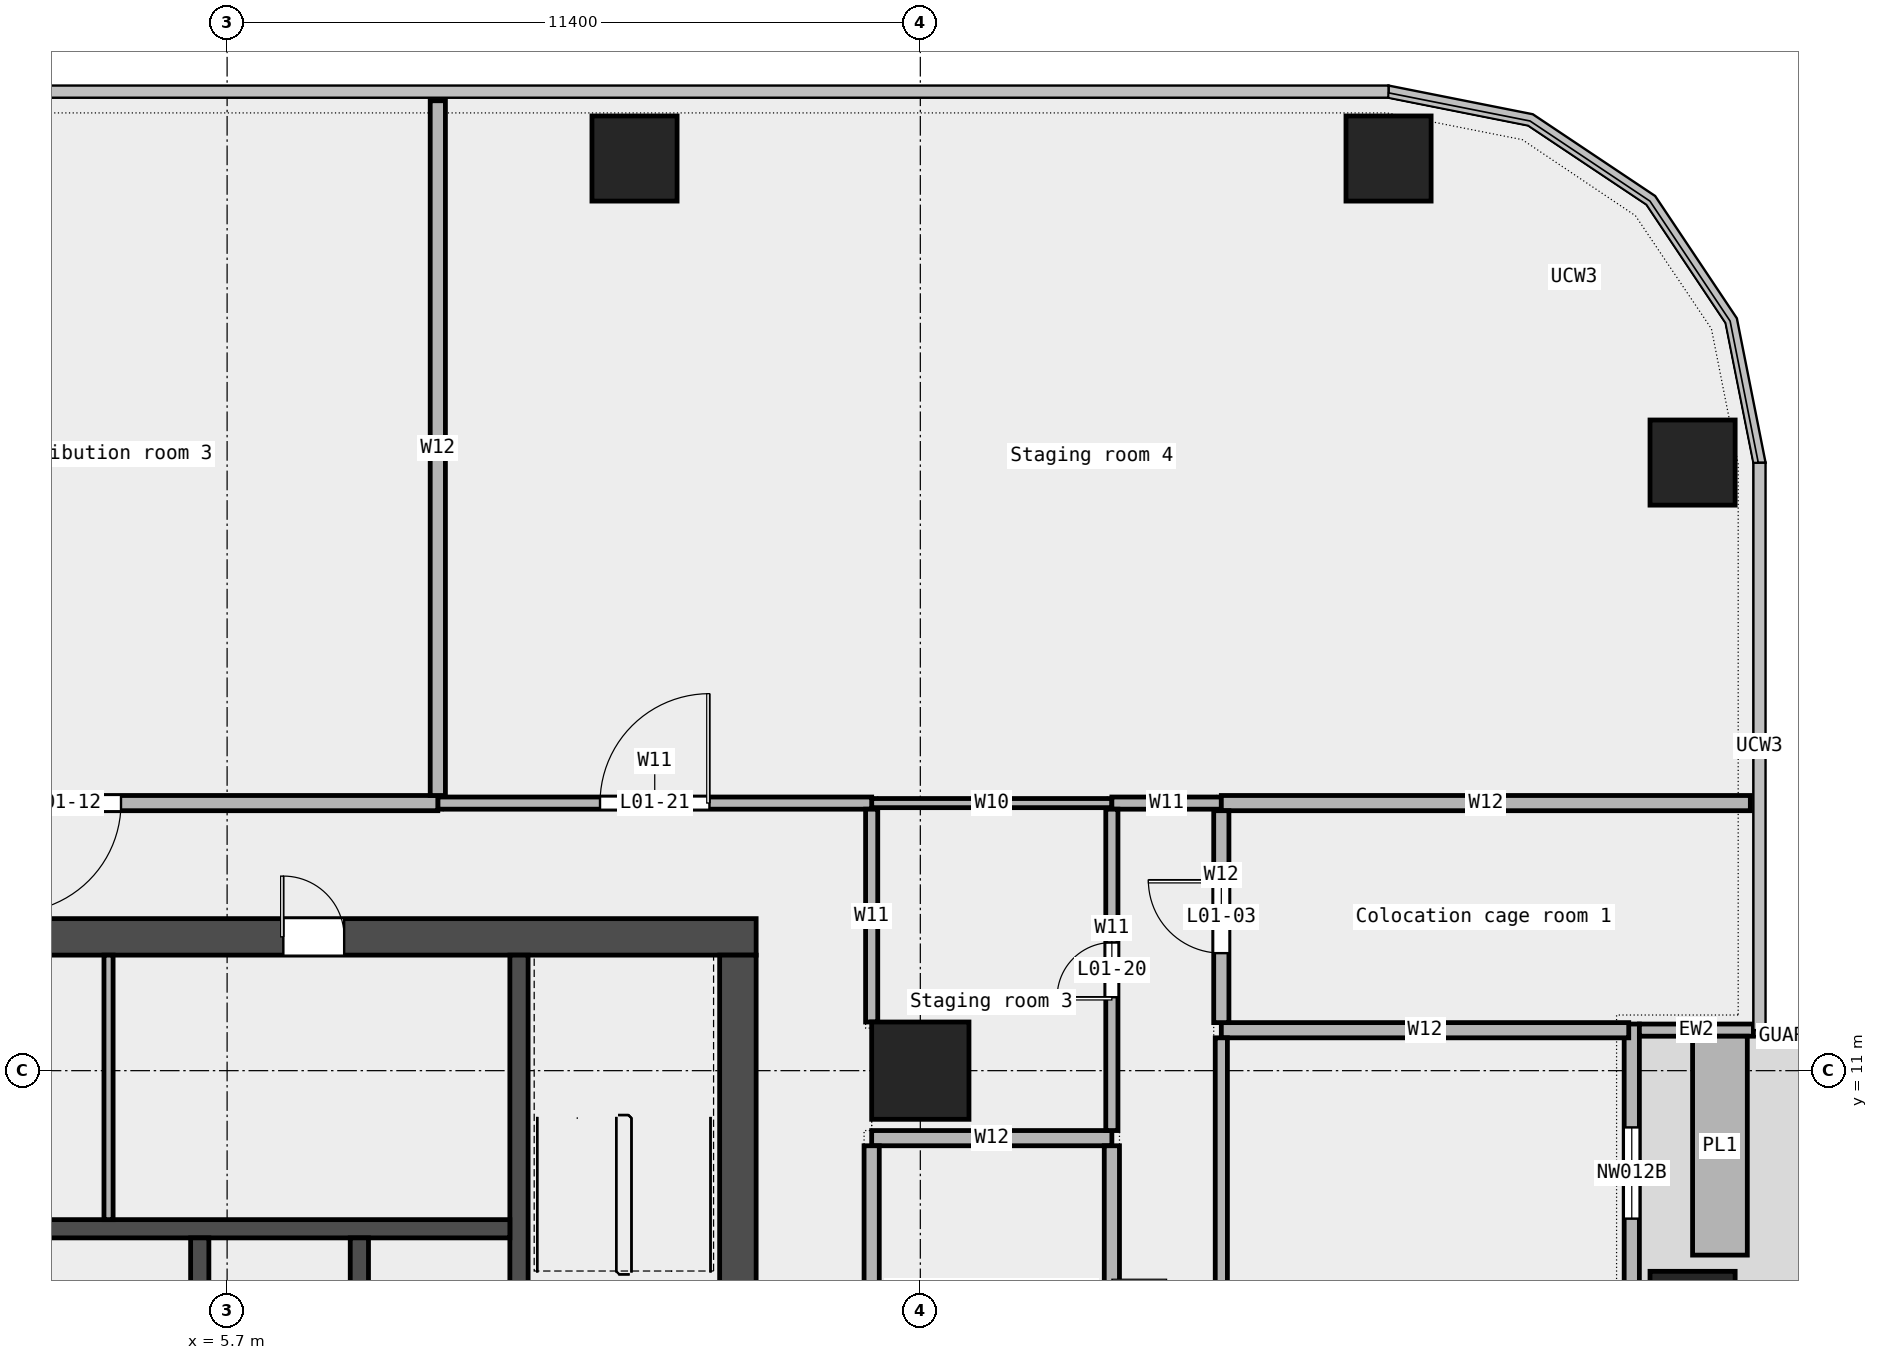
"""IFC4 building model, lengths in metres.
Left out: names, types, materials, properties, quantities, classifications, styles, units other than length and angle.
Written with IfcOpenShell. Run it as: python <this file> out.ifc"""

import sys

from ifc_helpers import new_model, si_unit, direction, frame, frame_2d, origin, origin_2d, place, context, subcontext, project, spatial, rectangle, extrude, element, fill, save


model = new_model("IFC4")
c1 = context("Model", 3, precision=1e-05, world=origin(), true_north=direction((0.0, 1.0)))
c2 = subcontext(c1, "Body", "Model", "MODEL_VIEW")
j1 = project(units=[si_unit("LENGTHUNIT", "METRE"), si_unit("PLANEANGLEUNIT", "RADIAN")], contexts=[c1])
p1 = place(None, origin())
s1 = spatial("IfcSite", under=j1, at=p1, CompositionType="ELEMENT")
p2 = place(p1, origin())
s2 = spatial("IfcBuilding", under=s1, at=p2, CompositionType="ELEMENT")
p3 = place(p2, frame((0.0, 0.0, 9.0)))
s3 = spatial("IfcBuildingStorey", under=s2, at=p3, CompositionType="ELEMENT", Elevation=9.0)
for number, where, z_axis, x_axis in (
    (1, (29.8, 7.0, 0.0), (0.0, 0.0, 1.0), (1.0, 0.0, 0.0)),
    (2, (29.8, 21.0, 0.0), (0.0, 0.0, 1.0), (1.0, 0.0, 0.0)),
    (3, (24.8, 26.0, 0.0), (0.0, 0.0, 1.0), (1.0, 0.0, 0.0)),
    (4, (12.4, 26.0, 0.0), (0.0, 0.0, 1.0), (1.0, 0.0, 0.0)),
):
    element("IfcColumn", number, at=place(p3, frame(where, z_axis=z_axis, x_axis=x_axis)), inside=s3, PredefinedType="COLUMN", context=c2, shape_type="SweptSolid", body=[
        extrude(rectangle(XDim=1.4, YDim=1.4, at=origin_2d()), origin(), (0.0, 0.0, 1.0), 5.0),
    ])
p4 = place(p3, frame((17.1, 11.0, 0.0), z_axis=(0.0, 0.0, 1.0), x_axis=(1.0, 0.0, 0.0)))
e5 = element("IfcColumn", 5, at=p4, inside=s3, PredefinedType="COLUMN", context=c2, shape_type="SweptSolid", body=[
    extrude(rectangle(XDim=1.6, YDim=1.6, at=origin_2d()), origin(), (0.0, 0.0, 1.0), 5.0),
])
p5 = place(p3, frame((28.8, -2.433, 0.0), z_axis=(0.0, 0.0, 1.0), x_axis=(0.0, 1.0, 0.0)))
e6 = element("IfcWall", 6, at=p5, inside=s3, PredefinedType="STANDARD", context=c2, shape_type="SweptSolid", body=[
    extrude(rectangle(XDim=14.2, YDim=0.25, at=frame_2d((7.1, 0.0))), origin(), (0.0, 0.0, 1.0), 5.0),
])
p6 = place(p5, frame((1.75, 0.0, 0.45)))
e7 = element("IfcOpeningElement", 7, at=p6, cuts=e6, PredefinedType="OPENING", context=c2, shape_type="SweptSolid", body=[
    extrude(rectangle(XDim=1.5, YDim=3.0, at=frame_2d((0.75, 1.5))), frame((0.0, 0.137, 0.0), z_axis=(0.0, -1.0, 0.0), x_axis=(1.0, 0.0, 0.0)), (0.0, 0.0, 1.0), 0.274),
])
p7 = place(p5, frame((6.25, 0.0, 0.0)))
e8 = element("IfcOpeningElement", 8, at=p7, cuts=e6, PredefinedType="OPENING", context=c2, shape_type="SweptSolid", body=[
    extrude(rectangle(XDim=1.8, YDim=2.4, at=frame_2d((0.9, 1.2))), frame((0.0, 0.137, 0.0), z_axis=(0.0, -1.0, 0.0), x_axis=(1.0, 0.0, 0.0)), (0.0, 0.0, 1.0), 0.274),
])
p8 = place(p5, frame((11.0, 0.0, 0.45)))
e9 = element("IfcOpeningElement", 9, at=p8, cuts=e6, PredefinedType="OPENING", context=c2, shape_type="SweptSolid", body=[
    extrude(rectangle(XDim=1.5, YDim=3.0, at=frame_2d((0.75, 1.5))), frame((0.0, 0.137, 0.0), z_axis=(0.0, -1.0, 0.0), x_axis=(1.0, 0.0, 0.0)), (0.0, 0.0, 1.0), 0.274),
])
p9 = place(p3, frame((30.8, 11.667, 0.0), z_axis=(0.0, 0.0, 1.0), x_axis=(-1.0, 0.0, 0.0)))
e10 = element("IfcWall", 10, at=p9, inside=s3, PredefinedType="STANDARD", context=c2, shape_type="SweptSolid", body=[
    extrude(rectangle(XDim=1.875, YDim=0.2, at=frame_2d((0.938, 0.0))), origin(), (0.0, 0.0, 1.0), 5.0),
])
p10 = place(p3, frame((30.25, 7.967, 0.0), z_axis=(0.0, 0.0, 1.0), x_axis=(0.0, 1.0, 0.0)))
e11 = element("IfcWall", 11, at=p10, inside=s3, PredefinedType="STANDARD", context=c2, shape_type="SweptSolid", body=[
    extrude(rectangle(XDim=3.6, YDim=0.9, at=frame_2d((1.8, 0.0))), origin(), (0.0, 0.0, 1.0), 0.7),
])
p11 = place(p3, frame((16.3, 9.89, 0.0), z_axis=(0.0, 0.0, 1.0), x_axis=(1.0, 0.0, 0.0)))
e12 = element("IfcWall", 12, at=p11, inside=s3, PredefinedType="PARTITIONING", context=c2, shape_type="SweptSolid", body=[
    extrude(rectangle(XDim=3.95, YDim=0.25, at=frame_2d((1.975, 0.0))), origin(), (0.0, 0.0, 1.0), 5.0),
])
p12 = place(p3, frame((22.05, 11.665, 0.0), z_axis=(0.0, 0.0, 1.0), x_axis=(1.0, 0.0, 0.0)))
e13 = element("IfcWall", 13, at=p12, inside=s3, PredefinedType="PARTITIONING", context=c2, shape_type="SweptSolid", body=[
    extrude(rectangle(XDim=6.7, YDim=0.25, at=frame_2d((3.35, 0.0))), origin(), (0.0, 0.0, 1.0), 5.0),
])
p13 = place(p3, frame((16.3, 15.4, 0.0), z_axis=(0.0, 0.0, 1.0), x_axis=(1.0, 0.0, 0.0)))
e14 = element("IfcWall", 14, at=p13, inside=s3, PredefinedType="PARTITIONING", context=c2, shape_type="SweptSolid", body=[
    extrude(rectangle(XDim=3.95, YDim=0.15, at=frame_2d((1.975, 0.0))), origin(), (0.0, 0.0, 1.0), 5.0),
])
p14 = place(p3, frame((9.165, 15.4, 0.0), z_axis=(0.0, 0.0, 1.0), x_axis=(1.0, 0.0, 0.0)))
e15 = element("IfcWall", 15, at=p14, inside=s3, PredefinedType="PARTITIONING", context=c2, shape_type="SweptSolid", body=[
    extrude(rectangle(XDim=7.135, YDim=0.2, at=frame_2d((3.567, 0.0))), origin(), (0.0, 0.0, 1.0), 5.0),
])
p15 = place(p14, frame((2.667, 0.0, 0.0)))
e16 = element("IfcOpeningElement", 16, at=p15, cuts=e15, PredefinedType="OPENING", context=c2, shape_type="SweptSolid", body=[
    extrude(rectangle(XDim=1.8, YDim=2.1, at=frame_2d((0.9, 1.05))), frame((0.0, 0.112, 0.0), z_axis=(0.0, -1.0, 0.0), x_axis=(1.0, 0.0, 0.0)), (0.0, 0.0, 1.0), 0.224),
])
p16 = place(p3, frame((20.25, 15.4, 0.0), z_axis=(0.0, 0.0, 1.0), x_axis=(1.0, 0.0, 0.0)))
e17 = element("IfcWall", 17, at=p16, inside=s3, PredefinedType="PARTITIONING", context=c2, shape_type="SweptSolid", body=[
    extrude(rectangle(XDim=1.8, YDim=0.2, at=frame_2d((0.9, 0.0))), origin(), (0.0, 0.0, 1.0), 5.0),
])
p17 = place(p3, frame((-22.55, 15.4, 0.0), z_axis=(0.0, 0.0, 1.0), x_axis=(1.0, 0.0, 0.0)))
e18 = element("IfcWall", 18, at=p17, inside=s3, PredefinedType="PARTITIONING", context=c2, shape_type="SweptSolid", body=[
    extrude(rectangle(XDim=31.715, YDim=0.25, at=frame_2d((15.857, 0.0))), origin(), (0.0, 0.0, 1.0), 5.0),
])
p18 = place(p17, frame((12.485, 0.0, 0.0)))
e19 = element("IfcOpeningElement", 19, at=p18, cuts=e18, PredefinedType="OPENING", context=c2, shape_type="SweptSolid", body=[
    extrude(rectangle(XDim=1.8, YDim=2.1, at=frame_2d((0.9, 1.05))), frame((0.0, 0.137, 0.0), z_axis=(0.0, -1.0, 0.0), x_axis=(1.0, 0.0, 0.0)), (0.0, 0.0, 1.0), 0.274),
])
p19 = place(p17, frame((24.705, 0.0, 0.0)))
e20 = element("IfcOpeningElement", 20, at=p19, cuts=e18, PredefinedType="OPENING", context=c2, shape_type="SweptSolid", body=[
    extrude(rectangle(XDim=1.8, YDim=2.1, at=frame_2d((0.9, 1.05))), frame((0.0, 0.137, 0.0), z_axis=(0.0, -1.0, 0.0), x_axis=(1.0, 0.0, 0.0)), (0.0, 0.0, 1.0), 0.274),
])
p20 = place(p3, frame((22.05, 15.4, 0.0), z_axis=(0.0, 0.0, 1.0), x_axis=(1.0, 0.0, 0.0)))
e21 = element("IfcWall", 21, at=p20, inside=s3, PredefinedType="PARTITIONING", context=c2, shape_type="SweptSolid", body=[
    extrude(rectangle(XDim=8.7, YDim=0.25, at=frame_2d((4.35, 0.0))), origin(), (0.0, 0.0, 1.0), 5.0),
])
p21 = place(p3, frame((9.165, 15.525, 0.0), z_axis=(0.0, 0.0, 1.0), x_axis=(0.0, 1.0, 0.0)))
e22 = element("IfcWall", 22, at=p21, inside=s3, PredefinedType="PARTITIONING", context=c2, shape_type="SweptSolid", body=[
    extrude(rectangle(XDim=11.425, YDim=0.25, at=frame_2d((5.712, 0.0))), origin(), (0.0, 0.0, 1.0), 5.0),
])
p22 = place(p3, frame((16.3, 11.8, 0.0), z_axis=(0.0, 0.0, 1.0), x_axis=(0.0, 1.0, 0.0)))
e23 = element("IfcWall", 23, at=p22, inside=s3, PredefinedType="PARTITIONING", context=c2, shape_type="SweptSolid", body=[
    extrude(rectangle(XDim=3.5, YDim=0.2, at=frame_2d((1.75, 0.0))), origin(), (0.0, 0.0, 1.0), 5.0),
])
p23 = place(p3, frame((16.3, 0.8, 0.0), z_axis=(0.0, 0.0, 1.0), x_axis=(0.0, 1.0, 0.0)))
e24 = element("IfcWall", 24, at=p23, inside=s3, PredefinedType="PARTITIONING", context=c2, shape_type="SweptSolid", body=[
    extrude(rectangle(XDim=8.965, YDim=0.25, at=frame_2d((4.482, 0.0))), origin(), (0.0, 0.0, 1.0), 5.0),
])
p24 = place(p3, frame((20.25, 10.015, 0.0), z_axis=(0.0, 0.0, 1.0), x_axis=(0.0, 1.0, 0.0)))
e25 = element("IfcWall", 25, at=p24, inside=s3, PredefinedType="PARTITIONING", context=c2, shape_type="SweptSolid", body=[
    extrude(rectangle(XDim=5.285, YDim=0.2, at=frame_2d((2.643, 0.0))), origin(), (0.0, 0.0, 1.0), 5.0),
])
p25 = place(p24, frame((2.192, 0.0, 0.0)))
e26 = element("IfcOpeningElement", 26, at=p25, cuts=e25, PredefinedType="OPENING", context=c2, shape_type="SweptSolid", body=[
    extrude(rectangle(XDim=0.9, YDim=2.1, at=frame_2d((0.45, 1.05))), frame((0.0, 0.112, 0.0), z_axis=(0.0, -1.0, 0.0), x_axis=(1.0, 0.0, 0.0)), (0.0, 0.0, 1.0), 0.224),
])
p26 = place(p3, frame((20.25, -1.0, 0.0), z_axis=(0.0, 0.0, 1.0), x_axis=(0.0, 1.0, 0.0)))
e27 = element("IfcWall", 27, at=p26, inside=s3, PredefinedType="PARTITIONING", context=c2, shape_type="SweptSolid", body=[
    extrude(rectangle(XDim=10.765, YDim=0.25, at=frame_2d((5.382, 0.0))), origin(), (0.0, 0.0, 1.0), 5.0),
])
p27 = place(p26, frame((2.242, 0.0, 0.0)))
e28 = element("IfcOpeningElement", 28, at=p27, cuts=e27, PredefinedType="OPENING", context=c2, shape_type="SweptSolid", body=[
    extrude(rectangle(XDim=0.9, YDim=2.1, at=frame_2d((0.45, 1.05))), frame((0.0, 0.137, 0.0), z_axis=(0.0, -1.0, 0.0), x_axis=(1.0, 0.0, 0.0)), (0.0, 0.0, 1.0), 0.274),
])
p28 = place(p26, frame((7.625, 0.0, 0.0)))
e29 = element("IfcOpeningElement", 29, at=p28, cuts=e27, PredefinedType="OPENING", context=c2, shape_type="SweptSolid", body=[
    extrude(rectangle(XDim=0.9, YDim=2.1, at=frame_2d((0.45, 1.05))), frame((0.0, 0.137, 0.0), z_axis=(0.0, -1.0, 0.0), x_axis=(1.0, 0.0, 0.0)), (0.0, 0.0, 1.0), 0.274),
])
p29 = place(p3, frame((22.05, -2.21, 0.0), z_axis=(0.0, 0.0, 1.0), x_axis=(0.0, 1.0, 0.0)))
e30 = element("IfcWall", 30, at=p29, inside=s3, PredefinedType="PARTITIONING", context=c2, shape_type="SweptSolid", body=[
    extrude(rectangle(XDim=13.75, YDim=0.2, at=frame_2d((6.875, 0.0))), origin(), (0.0, 0.0, 1.0), 5.0),
])
p30 = place(p29, frame((6.125, 0.0, 0.0)))
e31 = element("IfcOpeningElement", 31, at=p30, cuts=e30, PredefinedType="OPENING", context=c2, shape_type="SweptSolid", body=[
    extrude(rectangle(XDim=1.5, YDim=2.1, at=frame_2d((0.75, 1.05))), frame((0.0, 0.112, 0.0), z_axis=(0.0, -1.0, 0.0), x_axis=(1.0, 0.0, 0.0)), (0.0, 0.0, 1.0), 0.224),
])
p31 = place(p3, frame((22.05, 11.79, 0.0), z_axis=(0.0, 0.0, 1.0), x_axis=(0.0, 1.0, 0.0)))
e32 = element("IfcWall", 32, at=p31, inside=s3, PredefinedType="PARTITIONING", context=c2, shape_type="SweptSolid", body=[
    extrude(rectangle(XDim=3.485, YDim=0.25, at=frame_2d((1.742, 0.0))), origin(), (0.0, 0.0, 1.0), 5.0),
])
p32 = place(p31, frame((1.143, 0.0, 0.0)))
e33 = element("IfcOpeningElement", 33, at=p32, cuts=e32, PredefinedType="OPENING", context=c2, shape_type="SweptSolid", body=[
    extrude(rectangle(XDim=1.2, YDim=2.1, at=frame_2d((0.6, 1.05))), frame((0.0, 0.137, 0.0), z_axis=(0.0, -1.0, 0.0), x_axis=(1.0, 0.0, 0.0)), (0.0, 0.0, 1.0), 0.274),
])
p33 = place(p3, frame((-14.4, 13.2, 0.0), z_axis=(0.0, 0.0, 1.0), x_axis=(1.0, 0.0, 0.0)))
e34 = element("IfcWall", 34, at=p33, inside=s3, PredefinedType="SHEAR", context=c2, shape_type="SweptSolid", body=[
    extrude(rectangle(XDim=28.8, YDim=0.6, at=frame_2d((14.4, 0.0))), origin(), (0.0, 0.0, 1.0), 5.2),
])
p34 = place(p33, frame((6.212, 0.0, 0.0)))
e35 = element("IfcOpeningElement", 35, at=p34, cuts=e34, PredefinedType="OPENING", context=c2, shape_type="SweptSolid", body=[
    extrude(rectangle(XDim=1.0, YDim=2.1, at=frame_2d((0.5, 1.05))), frame((0.0, 0.312, 0.0), z_axis=(0.0, -1.0, 0.0), x_axis=(1.0, 0.0, 0.0)), (0.0, 0.0, 1.0), 0.624),
])
p35 = place(p33, frame((10.712, 0.0, 0.0)))
e36 = element("IfcOpeningElement", 36, at=p35, cuts=e34, PredefinedType="OPENING", context=c2, shape_type="SweptSolid", body=[
    extrude(rectangle(XDim=1.0, YDim=2.1, at=frame_2d((0.5, 1.05))), frame((0.0, 0.312, 0.0), z_axis=(0.0, -1.0, 0.0), x_axis=(1.0, 0.0, 0.0)), (0.0, 0.0, 1.0), 0.624),
])
p36 = place(p33, frame((15.025, 0.0, 0.0)))
e37 = element("IfcOpeningElement", 37, at=p36, cuts=e34, PredefinedType="OPENING", context=c2, shape_type="SweptSolid", body=[
    extrude(rectangle(XDim=1.0, YDim=2.1, at=frame_2d((0.5, 1.05))), frame((0.0, 0.312, 0.0), z_axis=(0.0, -1.0, 0.0), x_axis=(1.0, 0.0, 0.0)), (0.0, 0.0, 1.0), 0.624),
])
p37 = place(p33, frame((21.025, 0.0, 0.0)))
e38 = element("IfcOpeningElement", 38, at=p37, cuts=e34, PredefinedType="OPENING", context=c2, shape_type="SweptSolid", body=[
    extrude(rectangle(XDim=1.0, YDim=2.1, at=frame_2d((0.5, 1.05))), frame((0.0, 0.312, 0.0), z_axis=(0.0, -1.0, 0.0), x_axis=(1.0, 0.0, 0.0)), (0.0, 0.0, 1.0), 0.624),
])
p38 = place(p3, frame((14.1, -6.6, 0.0), z_axis=(0.0, 0.0, 1.0), x_axis=(0.0, 1.0, 0.0)))
e39 = element("IfcWall", 39, at=p38, inside=s3, PredefinedType="SHEAR", context=c2, shape_type="SweptSolid", body=[
    extrude(rectangle(XDim=19.5, YDim=0.6, at=frame_2d((9.75, 0.0))), origin(), (0.0, 0.0, 1.0), 5.2),
])
p39 = place(p38, frame((9.3, 0.0, 0.0)))
e40 = element("IfcOpeningElement", 40, at=p39, cuts=e39, PredefinedType="OPENING", context=c2, shape_type="SweptSolid", body=[
    extrude(rectangle(XDim=1.8, YDim=2.1, at=frame_2d((0.9, 1.05))), frame((0.0, 0.312, 0.0), z_axis=(0.0, -1.0, 0.0), x_axis=(1.0, 0.0, 0.0)), (0.0, 0.0, 1.0), 0.624),
])
p40 = place(p3, frame((10.5, 5.25, 0.0), z_axis=(0.0, 0.0, 1.0), x_axis=(0.0, 1.0, 0.0)))
e41 = element("IfcWall", 41, at=p40, inside=s3, PredefinedType="SHEAR", context=c2, shape_type="SweptSolid", body=[
    extrude(rectangle(XDim=7.65, YDim=0.3, at=frame_2d((3.825, 0.0))), origin(), (0.0, 0.0, 1.0), 5.2),
])
p41 = place(p3, frame((-10.35, 8.4, 0.0), z_axis=(0.0, 0.0, 1.0), x_axis=(1.0, 0.0, 0.0)))
e42 = element("IfcWall", 42, at=p41, inside=s3, PredefinedType="SOLIDWALL", context=c2, shape_type="SweptSolid", body=[
    extrude(rectangle(XDim=20.7, YDim=0.3, at=frame_2d((10.35, 0.0))), origin(), (0.0, 0.0, 1.0), 5.2),
])
for number, where, z_axis, x_axis in (
    (43, (5.25, 5.55, 0.0), (0.0, 0.0, 1.0), (0.0, 1.0, 0.0)),
    (44, (7.875, 5.55, 0.0), (0.0, 0.0, 1.0), (0.0, 1.0, 0.0)),
):
    element("IfcWall", number, at=place(p3, frame(where, z_axis=z_axis, x_axis=x_axis)), inside=s3, PredefinedType="SOLIDWALL", context=c2, shape_type="SweptSolid", body=[
        extrude(rectangle(XDim=2.7, YDim=0.3, at=frame_2d((1.35, 0.0))), origin(), (0.0, 0.0, 1.0), 5.2),
    ])
p42 = place(p3, frame((3.75, 8.55, 0.0), z_axis=(0.0, 0.0, 1.0), x_axis=(0.0, 1.0, 0.0)))
e45 = element("IfcWall", 45, at=p42, inside=s3, PredefinedType="PARTITIONING", context=c2, shape_type="SweptSolid", body=[
    extrude(rectangle(XDim=4.35, YDim=0.15, at=frame_2d((2.175, 0.0))), origin(), (0.0, 0.0, 1.0), 5.2),
])
p43 = place(p8, origin())
e46 = element("IfcWindow", 46, at=p43, inside=s3, PartitioningType="SINGLE_PANEL", PredefinedType="WINDOW", context=c2, shape_type="SweptSolid", body=[
    extrude(rectangle(XDim=1.5, YDim=3.0, at=frame_2d((0.75, 1.5))), frame((0.0, 0.03, 0.0), z_axis=(0.0, -1.0, 0.0), x_axis=(1.0, 0.0, 0.0)), (0.0, 0.0, 1.0), 0.06),
])
fill(e9, e46)
p44 = place(p32, origin())
e47 = element("IfcDoor", 47, at=p44, inside=s3, OperationType="SINGLE_SWING_RIGHT", PredefinedType="DOOR", context=c2, shape_type="SweptSolid", body=[
    extrude(rectangle(XDim=1.2, YDim=2.1, at=frame_2d((0.6, 1.05))), frame((0.0, 0.025, 0.0), z_axis=(0.0, -1.0, 0.0), x_axis=(1.0, 0.0, 0.0)), (0.0, 0.0, 1.0), 0.05),
])
fill(e33, e47)
p45 = place(p19, origin())
e48 = element("IfcDoor", 48, at=p45, inside=s3, OperationType="DOUBLE_DOOR_SINGLE_SWING", PredefinedType="DOOR", context=c2, shape_type="SweptSolid", body=[
    extrude(rectangle(XDim=1.8, YDim=2.1, at=frame_2d((0.9, 1.05))), frame((0.0, 0.025, 0.0), z_axis=(0.0, -1.0, 0.0), x_axis=(1.0, 0.0, 0.0)), (0.0, 0.0, 1.0), 0.05),
])
fill(e20, e48)
p46 = place(p25, origin())
e49 = element("IfcDoor", 49, at=p46, inside=s3, OperationType="SINGLE_SWING_LEFT", PredefinedType="DOOR", context=c2, shape_type="SweptSolid", body=[
    extrude(rectangle(XDim=0.9, YDim=2.1, at=frame_2d((0.45, 1.05))), frame((0.0, 0.025, 0.0), z_axis=(0.0, -1.0, 0.0), x_axis=(1.0, 0.0, 0.0)), (0.0, 0.0, 1.0), 0.05),
])
fill(e26, e49)
p47 = place(p15, origin())
e50 = element("IfcDoor", 50, at=p47, inside=s3, OperationType="DOUBLE_DOOR_SINGLE_SWING", PredefinedType="DOOR", context=c2, shape_type="SweptSolid", body=[
    extrude(rectangle(XDim=1.8, YDim=2.1, at=frame_2d((0.9, 1.05))), frame((0.0, 0.025, 0.0), z_axis=(0.0, -1.0, 0.0), x_axis=(1.0, 0.0, 0.0)), (0.0, 0.0, 1.0), 0.05),
])
fill(e16, e50)
p48 = place(p37, origin())
e51 = element("IfcDoor", 51, at=p48, inside=s3, OperationType="SINGLE_SWING_LEFT", PredefinedType="DOOR", context=c2, shape_type="SweptSolid", body=[
    extrude(rectangle(XDim=1.0, YDim=2.1, at=frame_2d((0.5, 1.05))), frame((0.0, 0.025, 0.0), z_axis=(0.0, -1.0, 0.0), x_axis=(1.0, 0.0, 0.0)), (0.0, 0.0, 1.0), 0.05),
])
fill(e38, e51)
save(model, sys.argv[1])
